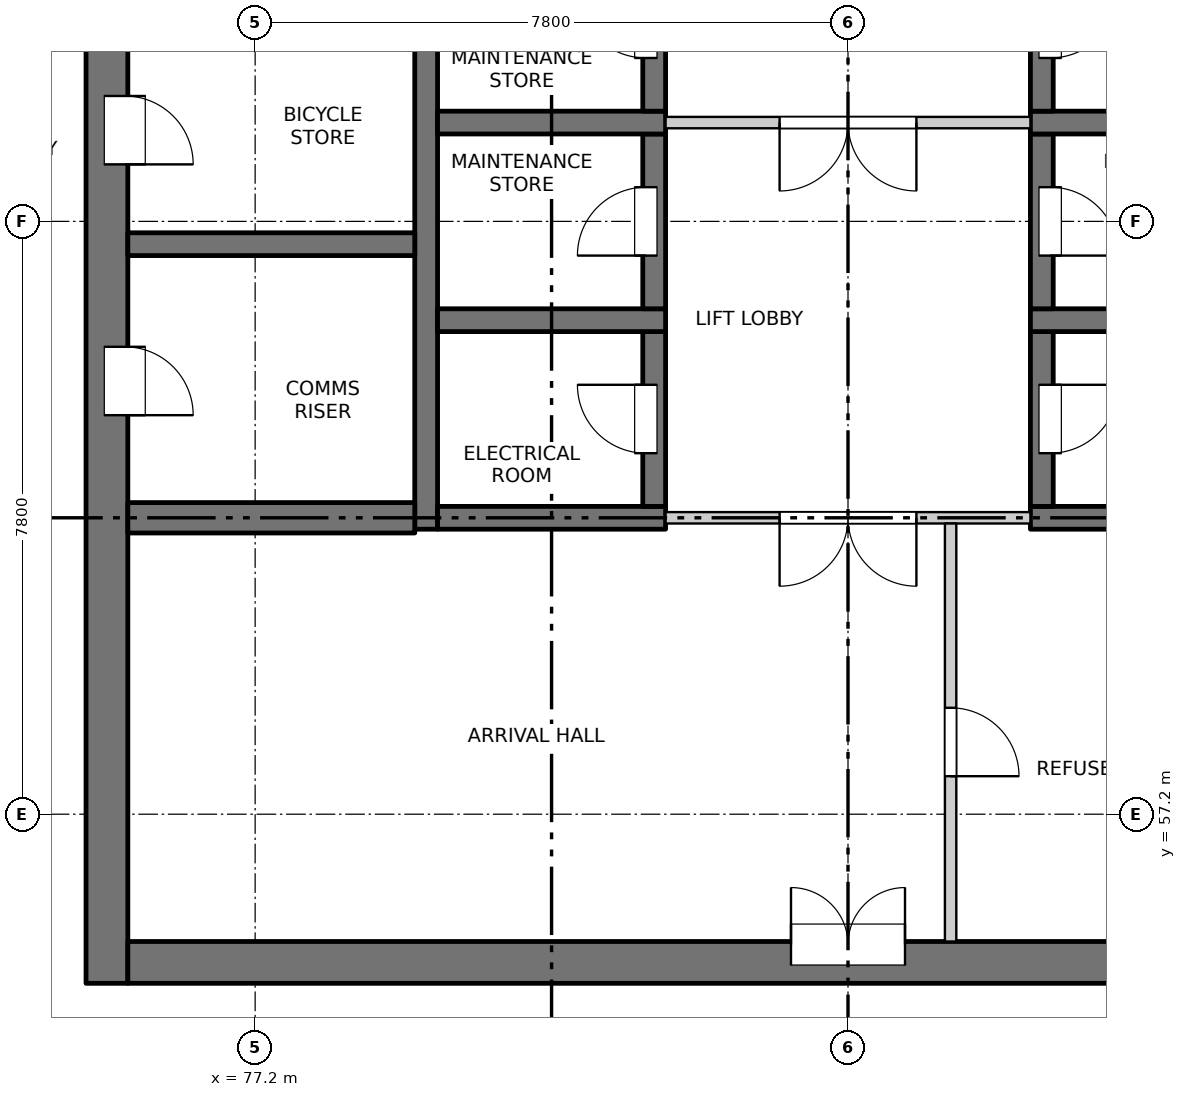
"""IFC4 building model, lengths in metres.
Left out: names, types, materials, properties, quantities, classifications, styles, units other than length and angle.
Written with IfcOpenShell. Run it as: python <this file> out.ifc"""

import sys

from ifc_helpers import new_model, si_unit, direction, frame, frame_2d, origin, place, context, subcontext, project, spatial, rectangle, extrude, element, fill, save


model = new_model("IFC4")
c1 = context("Model", 3, precision=1e-05, world=origin(), true_north=direction((0.0, 1.0)))
c2 = subcontext(c1, "Body", "Model", "MODEL_VIEW")
j1 = project(units=[si_unit("LENGTHUNIT", "METRE"), si_unit("PLANEANGLEUNIT", "RADIAN")], contexts=[c1])
p1 = place(None, origin())
s1 = spatial("IfcSite", under=j1, at=p1, CompositionType="ELEMENT")
p2 = place(p1, origin())
s2 = spatial("IfcBuilding", under=s1, at=p2, CompositionType="ELEMENT")
p3 = place(p2, frame((0.0, 0.0, 186.0)))
s3 = spatial("IfcBuildingStorey", under=s2, at=p3, CompositionType="ELEMENT", Elevation=186.0)
p4 = place(p3, frame((75.25, 54.975, -0.25), z_axis=(0.0, 0.0, 1.0), x_axis=(0.0, 1.0, 0.0)))
e1 = element("IfcWall", 1, at=p4, inside=s3, PredefinedType="SOLIDWALL", context=c2, shape_type="SweptSolid", body=[
    extrude(rectangle(XDim=22.325, YDim=0.55, at=frame_2d((11.163, 0.0))), origin(), (0.0, 0.0, 1.0), 3.4),
])
p5 = place(p4, frame((7.475, 0.0, 0.25)))
e2 = element("IfcOpeningElement", 2, at=p5, cuts=e1, PredefinedType="OPENING", context=c2, shape_type="SweptSolid", body=[
    extrude(rectangle(XDim=0.9, YDim=2.1, at=frame_2d((0.45, 1.05))), frame((0.0, 0.285, 0.0), z_axis=(0.0, -1.0, 0.0), x_axis=(1.0, 0.0, 0.0)), (0.0, 0.0, 1.0), 0.57),
])
p6 = place(p4, frame((10.775, 0.0, 0.25)))
e3 = element("IfcOpeningElement", 3, at=p6, cuts=e1, PredefinedType="OPENING", context=c2, shape_type="SweptSolid", body=[
    extrude(rectangle(XDim=0.9, YDim=2.1, at=frame_2d((0.45, 1.05))), frame((0.0, 0.285, 0.0), z_axis=(0.0, -1.0, 0.0), x_axis=(1.0, 0.0, 0.0)), (0.0, 0.0, 1.0), 0.57),
])
p7 = place(p4, frame((13.775, 0.0, 0.25)))
e4 = element("IfcOpeningElement", 4, at=p7, cuts=e1, PredefinedType="OPENING", context=c2, shape_type="SweptSolid", body=[
    extrude(rectangle(XDim=0.9, YDim=2.1, at=frame_2d((0.45, 1.05))), frame((0.0, 0.285, 0.0), z_axis=(0.0, -1.0, 0.0), x_axis=(1.0, 0.0, 0.0)), (0.0, 0.0, 1.0), 0.57),
])
p8 = place(p4, frame((16.775, 0.0, 0.25)))
e5 = element("IfcOpeningElement", 5, at=p8, cuts=e1, PredefinedType="OPENING", context=c2, shape_type="SweptSolid", body=[
    extrude(rectangle(XDim=0.9, YDim=2.1, at=frame_2d((0.45, 1.05))), frame((0.0, 0.285, 0.0), z_axis=(0.0, -1.0, 0.0), x_axis=(1.0, 0.0, 0.0)), (0.0, 0.0, 1.0), 0.57),
])
p9 = place(p4, frame((20.075, 0.0, 0.25)))
e6 = element("IfcOpeningElement", 6, at=p9, cuts=e1, PredefinedType="OPENING", context=c2, shape_type="SweptSolid", body=[
    extrude(rectangle(XDim=0.9, YDim=2.1, at=frame_2d((0.45, 1.05))), frame((0.0, 0.285, 0.0), z_axis=(0.0, -1.0, 0.0), x_axis=(1.0, 0.0, 0.0)), (0.0, 0.0, 1.0), 0.57),
])
p10 = place(p3, frame((75.525, 55.25, -0.25), z_axis=(0.0, 0.0, 1.0), x_axis=(1.0, 0.0, 0.0)))
e7 = element("IfcWall", 7, at=p10, inside=s3, PredefinedType="SOLIDWALL", context=c2, shape_type="SweptSolid", body=[
    extrude(rectangle(XDim=18.95, YDim=0.55, at=frame_2d((9.475, 0.0))), origin(), (0.0, 0.0, 1.0), 3.4),
])
p11 = place(p10, frame((8.725, 0.0, 0.25)))
e8 = element("IfcOpeningElement", 8, at=p11, cuts=e7, PredefinedType="OPENING", context=c2, shape_type="SweptSolid", body=[
    extrude(rectangle(XDim=1.5, YDim=2.1, at=frame_2d((0.75, 1.05))), frame((0.0, 0.285, 0.0), z_axis=(0.0, -1.0, 0.0), x_axis=(1.0, 0.0, 0.0)), (0.0, 0.0, 1.0), 0.57),
])
p12 = place(p3, frame((79.45, 60.95, -0.25), z_axis=(0.0, 0.0, 1.0), x_axis=(0.0, 1.0, 0.0)))
e9 = element("IfcWall", 9, at=p12, inside=s3, PredefinedType="SOLIDWALL", context=c2, shape_type="SweptSolid", body=[
    extrude(rectangle(XDim=16.35, YDim=0.3, at=frame_2d((8.175, 0.0))), origin(), (0.0, 0.0, 1.0), 3.4),
])
p13 = place(p3, frame((79.6, 61.1, -0.25), z_axis=(0.0, 0.0, 1.0), x_axis=(1.0, 0.0, 0.0)))
e10 = element("IfcWall", 10, at=p13, inside=s3, PredefinedType="SOLIDWALL", context=c2, shape_type="SweptSolid", body=[
    extrude(rectangle(XDim=3.0, YDim=0.3, at=frame_2d((1.5, 0.0))), origin(), (0.0, 0.0, 1.0), 3.4),
])
p14 = place(p3, frame((82.45, 61.25, -0.25), z_axis=(0.0, 0.0, 1.0), x_axis=(0.0, 1.0, 0.0)))
e11 = element("IfcWall", 11, at=p14, inside=s3, PredefinedType="SOLIDWALL", context=c2, shape_type="SweptSolid", body=[
    extrude(rectangle(XDim=2.3, YDim=0.3, at=frame_2d((1.15, 0.0))), origin(), (0.0, 0.0, 1.0), 3.4),
])
p15 = place(p14, frame((0.7, 0.0, 0.25)))
e12 = element("IfcOpeningElement", 12, at=p15, cuts=e11, PredefinedType="OPENING", context=c2, shape_type="SweptSolid", body=[
    extrude(rectangle(XDim=0.9, YDim=2.1, at=frame_2d((0.45, 1.05))), frame((0.0, 0.16, 0.0), z_axis=(0.0, -1.0, 0.0), x_axis=(1.0, 0.0, 0.0)), (0.0, 0.0, 1.0), 0.32),
])
p16 = place(p3, frame((79.6, 63.7, -0.25), z_axis=(0.0, 0.0, 1.0), x_axis=(1.0, 0.0, 0.0)))
e13 = element("IfcWall", 13, at=p16, inside=s3, PredefinedType="SOLIDWALL", context=c2, shape_type="SweptSolid", body=[
    extrude(rectangle(XDim=3.0, YDim=0.3, at=frame_2d((1.5, 0.0))), origin(), (0.0, 0.0, 1.0), 3.4),
])
p17 = place(p3, frame((82.45, 63.85, -0.25), z_axis=(0.0, 0.0, 1.0), x_axis=(0.0, 1.0, 0.0)))
e14 = element("IfcWall", 14, at=p17, inside=s3, PredefinedType="SOLIDWALL", context=c2, shape_type="SweptSolid", body=[
    extrude(rectangle(XDim=2.3, YDim=0.3, at=frame_2d((1.15, 0.0))), origin(), (0.0, 0.0, 1.0), 3.4),
])
p18 = place(p17, frame((0.7, 0.0, 0.25)))
e15 = element("IfcOpeningElement", 15, at=p18, cuts=e14, PredefinedType="OPENING", context=c2, shape_type="SweptSolid", body=[
    extrude(rectangle(XDim=0.9, YDim=2.1, at=frame_2d((0.45, 1.05))), frame((0.0, 0.16, 0.0), z_axis=(0.0, -1.0, 0.0), x_axis=(1.0, 0.0, 0.0)), (0.0, 0.0, 1.0), 0.32),
])
p19 = place(p3, frame((79.6, 66.3, -0.25), z_axis=(0.0, 0.0, 1.0), x_axis=(1.0, 0.0, 0.0)))
e16 = element("IfcWall", 16, at=p19, inside=s3, PredefinedType="SOLIDWALL", context=c2, shape_type="SweptSolid", body=[
    extrude(rectangle(XDim=3.0, YDim=0.3, at=frame_2d((1.5, 0.0))), origin(), (0.0, 0.0, 1.0), 3.4),
])
p20 = place(p3, frame((82.45, 66.45, -0.25), z_axis=(0.0, 0.0, 1.0), x_axis=(0.0, 1.0, 0.0)))
e17 = element("IfcWall", 17, at=p20, inside=s3, PredefinedType="SOLIDWALL", context=c2, shape_type="SweptSolid", body=[
    extrude(rectangle(XDim=2.3, YDim=0.3, at=frame_2d((1.15, 0.0))), origin(), (0.0, 0.0, 1.0), 3.4),
])
p21 = place(p20, frame((0.7, 0.0, 0.25)))
e18 = element("IfcOpeningElement", 18, at=p21, cuts=e17, PredefinedType="OPENING", context=c2, shape_type="SweptSolid", body=[
    extrude(rectangle(XDim=0.9, YDim=2.1, at=frame_2d((0.45, 1.05))), frame((0.0, 0.16, 0.0), z_axis=(0.0, -1.0, 0.0), x_axis=(1.0, 0.0, 0.0)), (0.0, 0.0, 1.0), 0.32),
])
p22 = place(p3, frame((87.4, 61.1, -0.25), z_axis=(0.0, 0.0, 1.0), x_axis=(1.0, 0.0, 0.0)))
e19 = element("IfcWall", 19, at=p22, inside=s3, PredefinedType="SOLIDWALL", context=c2, shape_type="SweptSolid", body=[
    extrude(rectangle(XDim=3.0, YDim=0.3, at=frame_2d((1.5, 0.0))), origin(), (0.0, 0.0, 1.0), 3.4),
])
p23 = place(p3, frame((87.55, 61.25, -0.25), z_axis=(0.0, 0.0, 1.0), x_axis=(0.0, 1.0, 0.0)))
e20 = element("IfcWall", 20, at=p23, inside=s3, PredefinedType="SOLIDWALL", context=c2, shape_type="SweptSolid", body=[
    extrude(rectangle(XDim=2.3, YDim=0.3, at=frame_2d((1.15, 0.0))), origin(), (0.0, 0.0, 1.0), 3.4),
])
p24 = place(p23, frame((0.7, 0.0, 0.25)))
e21 = element("IfcOpeningElement", 21, at=p24, cuts=e20, PredefinedType="OPENING", context=c2, shape_type="SweptSolid", body=[
    extrude(rectangle(XDim=0.9, YDim=2.1, at=frame_2d((0.45, 1.05))), frame((0.0, 0.16, 0.0), z_axis=(0.0, -1.0, 0.0), x_axis=(1.0, 0.0, 0.0)), (0.0, 0.0, 1.0), 0.32),
])
p25 = place(p3, frame((87.4, 63.7, -0.25), z_axis=(0.0, 0.0, 1.0), x_axis=(1.0, 0.0, 0.0)))
e22 = element("IfcWall", 22, at=p25, inside=s3, PredefinedType="SOLIDWALL", context=c2, shape_type="SweptSolid", body=[
    extrude(rectangle(XDim=3.0, YDim=0.3, at=frame_2d((1.5, 0.0))), origin(), (0.0, 0.0, 1.0), 3.4),
])
p26 = place(p3, frame((87.55, 63.85, -0.25), z_axis=(0.0, 0.0, 1.0), x_axis=(0.0, 1.0, 0.0)))
e23 = element("IfcWall", 23, at=p26, inside=s3, PredefinedType="SOLIDWALL", context=c2, shape_type="SweptSolid", body=[
    extrude(rectangle(XDim=2.3, YDim=0.3, at=frame_2d((1.15, 0.0))), origin(), (0.0, 0.0, 1.0), 3.4),
])
p27 = place(p26, frame((0.7, 0.0, 0.25)))
e24 = element("IfcOpeningElement", 24, at=p27, cuts=e23, PredefinedType="OPENING", context=c2, shape_type="SweptSolid", body=[
    extrude(rectangle(XDim=0.9, YDim=2.1, at=frame_2d((0.45, 1.05))), frame((0.0, 0.16, 0.0), z_axis=(0.0, -1.0, 0.0), x_axis=(1.0, 0.0, 0.0)), (0.0, 0.0, 1.0), 0.32),
])
p28 = place(p3, frame((87.4, 66.3, -0.25), z_axis=(0.0, 0.0, 1.0), x_axis=(1.0, 0.0, 0.0)))
e25 = element("IfcWall", 25, at=p28, inside=s3, PredefinedType="SOLIDWALL", context=c2, shape_type="SweptSolid", body=[
    extrude(rectangle(XDim=3.0, YDim=0.3, at=frame_2d((1.5, 0.0))), origin(), (0.0, 0.0, 1.0), 3.4),
])
p29 = place(p3, frame((87.55, 66.45, -0.25), z_axis=(0.0, 0.0, 1.0), x_axis=(0.0, 1.0, 0.0)))
e26 = element("IfcWall", 26, at=p29, inside=s3, PredefinedType="SOLIDWALL", context=c2, shape_type="SweptSolid", body=[
    extrude(rectangle(XDim=2.3, YDim=0.3, at=frame_2d((1.15, 0.0))), origin(), (0.0, 0.0, 1.0), 3.4),
])
p30 = place(p29, frame((0.7, 0.0, 0.25)))
e27 = element("IfcOpeningElement", 27, at=p30, cuts=e26, PredefinedType="OPENING", context=c2, shape_type="SweptSolid", body=[
    extrude(rectangle(XDim=0.9, YDim=2.1, at=frame_2d((0.45, 1.05))), frame((0.0, 0.16, 0.0), z_axis=(0.0, -1.0, 0.0), x_axis=(1.0, 0.0, 0.0)), (0.0, 0.0, 1.0), 0.32),
])
p31 = place(p3, frame((75.525, 61.1, -0.25), z_axis=(0.0, 0.0, 1.0), x_axis=(1.0, 0.0, 0.0)))
e28 = element("IfcWall", 28, at=p31, inside=s3, PredefinedType="SOLIDWALL", context=c2, shape_type="SweptSolid", body=[
    extrude(rectangle(XDim=3.775, YDim=0.4, at=frame_2d((1.888, 0.0))), origin(), (0.0, 0.0, 1.0), 3.4),
])
p32 = place(p3, frame((75.525, 64.7, -0.25), z_axis=(0.0, 0.0, 1.0), x_axis=(1.0, 0.0, 0.0)))
e29 = element("IfcWall", 29, at=p32, inside=s3, PredefinedType="SOLIDWALL", context=c2, shape_type="SweptSolid", body=[
    extrude(rectangle(XDim=3.775, YDim=0.3, at=frame_2d((1.888, 0.0))), origin(), (0.0, 0.0, 1.0), 3.4),
])
p33 = place(p3, frame((82.6, 61.1, 0.0), z_axis=(0.0, 0.0, 1.0), x_axis=(1.0, 0.0, 0.0)))
e30 = element("IfcWall", 30, at=p33, inside=s3, PredefinedType="PARTITIONING", context=c2, shape_type="SweptSolid", body=[
    extrude(rectangle(XDim=4.8, YDim=0.15, at=frame_2d((2.4, 0.0))), origin(), (0.0, 0.0, 1.0), 3.15),
])
p34 = place(p33, frame((1.5, 0.0, 0.0)))
e31 = element("IfcOpeningElement", 31, at=p34, cuts=e30, PredefinedType="OPENING", context=c2, shape_type="SweptSolid", body=[
    extrude(rectangle(XDim=1.8, YDim=2.1, at=frame_2d((0.9, 1.05))), frame((0.0, 0.085, 0.0), z_axis=(0.0, -1.0, 0.0), x_axis=(1.0, 0.0, 0.0)), (0.0, 0.0, 1.0), 0.17),
])
p35 = place(p3, frame((82.6, 66.3, 0.0), z_axis=(0.0, 0.0, 1.0), x_axis=(1.0, 0.0, 0.0)))
e32 = element("IfcWall", 32, at=p35, inside=s3, PredefinedType="PARTITIONING", context=c2, shape_type="SweptSolid", body=[
    extrude(rectangle(XDim=4.8, YDim=0.15, at=frame_2d((2.4, 0.0))), origin(), (0.0, 0.0, 1.0), 3.15),
])
p36 = place(p35, frame((1.5, 0.0, 0.0)))
e33 = element("IfcOpeningElement", 33, at=p36, cuts=e32, PredefinedType="OPENING", context=c2, shape_type="SweptSolid", body=[
    extrude(rectangle(XDim=1.8, YDim=2.1, at=frame_2d((0.9, 1.05))), frame((0.0, 0.085, 0.0), z_axis=(0.0, -1.0, 0.0), x_axis=(1.0, 0.0, 0.0)), (0.0, 0.0, 1.0), 0.17),
])
p37 = place(p3, frame((86.35, 55.525, 0.0), z_axis=(0.0, 0.0, 1.0), x_axis=(0.0, 1.0, 0.0)))
e34 = element("IfcWall", 34, at=p37, inside=s3, PredefinedType="PARTITIONING", context=c2, shape_type="SweptSolid", body=[
    extrude(rectangle(XDim=5.5, YDim=0.15, at=frame_2d((2.75, 0.0))), origin(), (0.0, 0.0, 1.0), 3.15),
])
p38 = place(p37, frame((2.175, 0.0, 0.0)))
e35 = element("IfcOpeningElement", 35, at=p38, cuts=e34, PredefinedType="OPENING", context=c2, shape_type="SweptSolid", body=[
    extrude(rectangle(XDim=0.9, YDim=2.1, at=frame_2d((0.45, 1.05))), frame((0.0, 0.085, 0.0), z_axis=(0.0, -1.0, 0.0), x_axis=(1.0, 0.0, 0.0)), (0.0, 0.0, 1.0), 0.17),
])
p39 = place(p11, origin())
e36 = element("IfcDoor", 36, at=p39, inside=s3, OperationType="DOUBLE_DOOR_SINGLE_SWING", PredefinedType="DOOR", context=c2, shape_type="SweptSolid", body=[
    extrude(rectangle(XDim=1.5, YDim=2.1, at=frame_2d((0.75, 1.05))), frame((0.0, 0.26, 0.0), z_axis=(0.0, -1.0, 0.0), x_axis=(1.0, 0.0, 0.0)), (0.0, 0.0, 1.0), 0.05),
])
fill(e8, e36)
p40 = place(p38, origin())
e37 = element("IfcDoor", 37, at=p40, inside=s3, OperationType="SINGLE_SWING_RIGHT", PredefinedType="DOOR", context=c2, shape_type="SweptSolid", body=[
    extrude(rectangle(XDim=0.9, YDim=2.1, at=frame_2d((0.45, 1.05))), frame((0.0, 0.025, 0.0), z_axis=(0.0, -1.0, 0.0), x_axis=(1.0, 0.0, 0.0)), (0.0, 0.0, 1.0), 0.05),
])
fill(e35, e37)
p41 = place(p34, origin())
e38 = element("IfcDoor", 38, at=p41, inside=s3, OperationType="DOUBLE_DOOR_SINGLE_SWING", PredefinedType="DOOR", context=c2, shape_type="SweptSolid", body=[
    extrude(rectangle(XDim=1.8, YDim=2.1, at=frame_2d((0.9, 1.05))), frame((0.0, 0.025, 0.0), z_axis=(0.0, -1.0, 0.0), x_axis=(1.0, 0.0, 0.0)), (0.0, 0.0, 1.0), 0.05),
])
fill(e31, e38)
p42 = place(p15, origin())
e39 = element("IfcDoor", 39, at=p42, inside=s3, OperationType="SINGLE_SWING_RIGHT", PredefinedType="DOOR", context=c2, shape_type="SweptSolid", body=[
    extrude(rectangle(XDim=0.9, YDim=2.1, at=frame_2d((0.45, 1.05))), frame((0.0, 0.135, 0.0), z_axis=(0.0, -1.0, 0.0), x_axis=(1.0, 0.0, 0.0)), (0.0, 0.0, 1.0), 0.05),
])
fill(e12, e39)
p43 = place(p24, origin())
e40 = element("IfcDoor", 40, at=p43, inside=s3, OperationType="SINGLE_SWING_LEFT", PredefinedType="DOOR", context=c2, shape_type="SweptSolid", body=[
    extrude(rectangle(XDim=0.9, YDim=2.1, at=frame_2d((0.45, 1.05))), frame((0.0, -0.085, 0.0), z_axis=(0.0, -1.0, 0.0), x_axis=(1.0, 0.0, 0.0)), (0.0, 0.0, 1.0), 0.05),
])
fill(e21, e40)
p44 = place(p5, origin())
e41 = element("IfcDoor", 41, at=p44, inside=s3, OperationType="SINGLE_SWING_RIGHT", PredefinedType="DOOR", context=c2, shape_type="SweptSolid", body=[
    extrude(rectangle(XDim=0.9, YDim=2.1, at=frame_2d((0.45, 1.05))), frame((0.0, -0.21, 0.0), z_axis=(0.0, -1.0, 0.0), x_axis=(1.0, 0.0, 0.0)), (0.0, 0.0, 1.0), 0.05),
])
fill(e2, e41)
p45 = place(p18, origin())
e42 = element("IfcDoor", 42, at=p45, inside=s3, OperationType="SINGLE_SWING_LEFT", PredefinedType="DOOR", context=c2, shape_type="SweptSolid", body=[
    extrude(rectangle(XDim=0.9, YDim=2.1, at=frame_2d((0.45, 1.05))), frame((0.0, 0.135, 0.0), z_axis=(0.0, -1.0, 0.0), x_axis=(1.0, 0.0, 0.0)), (0.0, 0.0, 1.0), 0.05),
])
fill(e15, e42)
p46 = place(p27, origin())
e43 = element("IfcDoor", 43, at=p46, inside=s3, OperationType="SINGLE_SWING_RIGHT", PredefinedType="DOOR", context=c2, shape_type="SweptSolid", body=[
    extrude(rectangle(XDim=0.9, YDim=2.1, at=frame_2d((0.45, 1.05))), frame((0.0, -0.085, 0.0), z_axis=(0.0, -1.0, 0.0), x_axis=(1.0, 0.0, 0.0)), (0.0, 0.0, 1.0), 0.05),
])
fill(e24, e43)
p47 = place(p6, origin())
e44 = element("IfcDoor", 44, at=p47, inside=s3, OperationType="SINGLE_SWING_RIGHT", PredefinedType="DOOR", context=c2, shape_type="SweptSolid", body=[
    extrude(rectangle(XDim=0.9, YDim=2.1, at=frame_2d((0.45, 1.05))), frame((0.0, -0.21, 0.0), z_axis=(0.0, -1.0, 0.0), x_axis=(1.0, 0.0, 0.0)), (0.0, 0.0, 1.0), 0.05),
])
fill(e3, e44)
p48 = place(p36, origin())
e45 = element("IfcDoor", 45, at=p48, inside=s3, OperationType="DOUBLE_DOOR_SINGLE_SWING", PredefinedType="DOOR", context=c2, shape_type="SweptSolid", body=[
    extrude(rectangle(XDim=1.8, YDim=2.1, at=frame_2d((0.9, 1.05))), frame((0.0, 0.025, 0.0), z_axis=(0.0, -1.0, 0.0), x_axis=(1.0, 0.0, 0.0)), (0.0, 0.0, 1.0), 0.05),
])
fill(e33, e45)
p49 = place(p21, origin())
e46 = element("IfcDoor", 46, at=p49, inside=s3, OperationType="SINGLE_SWING_RIGHT", PredefinedType="DOOR", context=c2, shape_type="SweptSolid", body=[
    extrude(rectangle(XDim=0.9, YDim=2.1, at=frame_2d((0.45, 1.05))), frame((0.0, 0.135, 0.0), z_axis=(0.0, -1.0, 0.0), x_axis=(1.0, 0.0, 0.0)), (0.0, 0.0, 1.0), 0.05),
])
fill(e18, e46)
p50 = place(p30, origin())
e47 = element("IfcDoor", 47, at=p50, inside=s3, OperationType="SINGLE_SWING_LEFT", PredefinedType="DOOR", context=c2, shape_type="SweptSolid", body=[
    extrude(rectangle(XDim=0.9, YDim=2.1, at=frame_2d((0.45, 1.05))), frame((0.0, -0.085, 0.0), z_axis=(0.0, -1.0, 0.0), x_axis=(1.0, 0.0, 0.0)), (0.0, 0.0, 1.0), 0.05),
])
fill(e27, e47)
save(model, sys.argv[1])
